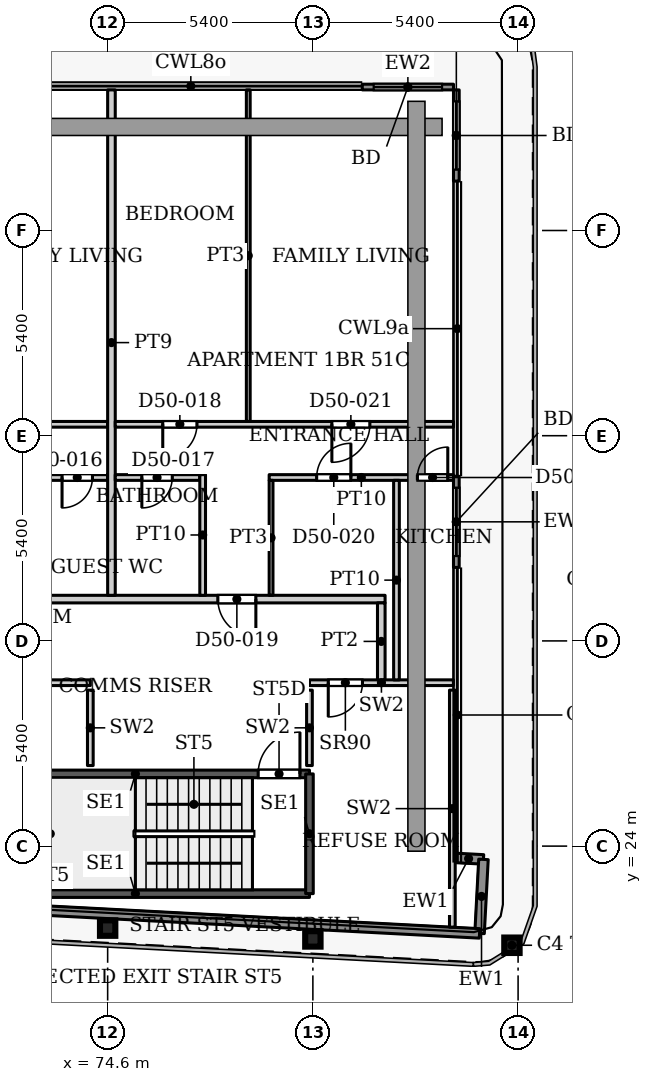
"""IFC4 building model, lengths in metres.
Left out: names, types, materials, properties, quantities, classifications, styles, units other than length and angle.
Written with IfcOpenShell. Run it as: python <this file> out.ifc"""

import sys

from ifc_helpers import new_model, si_unit, direction, frame, frame_2d, origin, origin_2d, place, context, subcontext, project, spatial, rectangle, i_section, extrude, source, transform, mapped, element, fill, save


model = new_model("IFC4")
c1 = context("Model", 3, precision=1e-05, world=origin(), true_north=direction((0.0, 1.0)))
c2 = subcontext(c1, "Body", "Model", "MODEL_VIEW")
j1 = project(units=[si_unit("LENGTHUNIT", "METRE"), si_unit("PLANEANGLEUNIT", "RADIAN")], contexts=[c1])
p1 = place(None, origin())
s1 = spatial("IfcSite", under=j1, at=p1, CompositionType="ELEMENT")
p2 = place(p1, origin())
s2 = spatial("IfcBuilding", under=s1, at=p2, CompositionType="ELEMENT")
p3 = place(p2, frame((0.0, 0.0, 220.1)))
s3 = spatial("IfcBuildingStorey", under=s2, at=p3, CompositionType="ELEMENT", Elevation=220.1)
for number, where, z_axis, x_axis in (
    (1, (85.238, 21.391, 0.0), (0.0, 0.0, 1.0), (1.0, 0.0, 0.0)),
    (2, (80.0, 21.558, 0.0), (0.0, 0.0, 1.0), (1.0, 0.0, 0.0)),
    (3, (74.6, 21.843, 0.0), (0.0, 0.0, 1.0), (1.0, 0.0, 0.0)),
):
    element("IfcColumn", number, at=place(p3, frame(where, z_axis=z_axis, x_axis=x_axis)), inside=s3, PredefinedType="COLUMN", context=c2, shape_type="SweptSolid", body=[
        extrude(i_section(OverallWidth=0.404, OverallDepth=0.407, WebThickness=0.027, FlangeThickness=0.044, FilletRadius=0.012, at=origin_2d()), origin(), (0.0, 0.0, 1.0), 3.9),
    ])
p4 = place(p3, frame((81.3, 43.975, 0.0), z_axis=(0.0, 0.0, 1.0), x_axis=(1.0, 0.0, 0.0)))
e4 = element("IfcWall", 4, at=p4, inside=s3, PredefinedType="SOLIDWALL", context=c2, shape_type="SweptSolid", body=[
    extrude(rectangle(XDim=2.4, YDim=0.15, at=frame_2d((1.2, 0.0))), origin(), (0.0, 0.0, 1.0), 3.75),
])
p5 = place(p4, frame((0.3, 0.0, 0.0)))
e5 = element("IfcOpeningElement", 5, at=p5, cuts=e4, PredefinedType="OPENING", context=c2, shape_type="SweptSolid", body=[
    extrude(rectangle(XDim=1.8, YDim=2.4, at=frame_2d((0.9, 1.2))), frame((0.0, 0.085, 0.0), z_axis=(0.0, -1.0, 0.0), x_axis=(1.0, 0.0, 0.0)), (0.0, 0.0, 1.0), 0.17),
])
p6 = place(p3, frame((83.775, 43.9, 0.0), z_axis=(0.0, 0.0, 1.0), x_axis=(0.0, -1.0, 0.0)))
e6 = element("IfcWall", 6, at=p6, inside=s3, PredefinedType="SOLIDWALL", context=c2, shape_type="SweptSolid", body=[
    extrude(rectangle(XDim=2.4, YDim=0.15, at=frame_2d((1.2, 0.0))), origin(), (0.0, 0.0, 1.0), 3.75),
])
p7 = place(p6, frame((0.3, 0.0, 0.0)))
e7 = element("IfcOpeningElement", 7, at=p7, cuts=e6, PredefinedType="OPENING", context=c2, shape_type="SweptSolid", body=[
    extrude(rectangle(XDim=1.8, YDim=2.4, at=frame_2d((0.9, 1.2))), frame((0.0, 0.085, 0.0), z_axis=(0.0, -1.0, 0.0), x_axis=(1.0, 0.0, 0.0)), (0.0, 0.0, 1.0), 0.17),
])
p8 = place(p3, frame((83.775, 33.733, 0.0), z_axis=(0.0, 0.0, 1.0), x_axis=(0.0, -1.0, 0.0)))
e8 = element("IfcWall", 8, at=p8, inside=s3, PredefinedType="SOLIDWALL", context=c2, shape_type="SweptSolid", body=[
    extrude(rectangle(XDim=2.399, YDim=0.15, at=frame_2d((1.199, 0.0))), origin(), (0.0, 0.0, 1.0), 3.75),
])
p9 = place(p8, frame((0.3, 0.0, 0.0)))
e9 = element("IfcOpeningElement", 9, at=p9, cuts=e8, PredefinedType="OPENING", context=c2, shape_type="SweptSolid", body=[
    extrude(rectangle(XDim=1.8, YDim=2.4, at=frame_2d((0.9, 1.2))), frame((0.0, 0.085, 0.0), z_axis=(0.0, -1.0, 0.0), x_axis=(1.0, 0.0, 0.0)), (0.0, 0.0, 1.0), 0.17),
])
p10 = place(p3, frame((83.707, 23.692, 0.0), z_axis=(0.0, 0.0, 1.0), x_axis=(0.998561284263, -0.053622398031, 0.0)))
e10 = element("IfcWall", 10, at=p10, inside=s3, PredefinedType="SOLIDWALL", context=c2, shape_type="SweptSolid", body=[
    extrude(rectangle(XDim=0.783, YDim=0.25, at=frame_2d((0.392, 0.0))), origin(), (0.0, 0.0, 1.0), 3.75),
])
p11 = place(p3, frame((84.489, 23.65, 0.0), z_axis=(0.0, 0.0, 1.0), x_axis=(-0.052841433274, -0.998602915542, 0.0)))
e11 = element("IfcWall", 11, at=p11, inside=s3, PredefinedType="SOLIDWALL", context=c2, shape_type="SweptSolid", body=[
    extrude(rectangle(XDim=1.95, YDim=0.25, at=frame_2d((0.975, 0.0))), origin(), (0.0, 0.0, 1.0), 3.75),
])
p12 = place(p3, frame((84.386, 21.703, 0.0), z_axis=(0.0, 0.0, 1.0), x_axis=(-0.998617508267, 0.05256493302, 0.0)))
e12 = element("IfcWall", 12, at=p12, inside=s3, PredefinedType="SOLIDWALL", context=c2, shape_type="SweptSolid", body=[
    extrude(rectangle(XDim=50.417, YDim=0.25, at=frame_2d((25.208, 0.0))), origin(), (0.0, 0.0, 1.0), 3.75),
])
p13 = place(p3, frame((70.75, 22.75, 0.0), z_axis=(0.0, 0.0, 1.0), x_axis=(1.0, 0.0, 0.0)))
e13 = element("IfcWall", 13, at=p13, inside=s3, PredefinedType="SHEAR", context=c2, shape_type="SweptSolid", body=[
    extrude(rectangle(XDim=9.16, YDim=0.2, at=frame_2d((4.58, 0.0))), origin(), (0.0, 0.0, 1.0), 3.9),
])
p14 = place(p3, frame((70.75, 25.9, 0.0), z_axis=(0.0, 0.0, 1.0), x_axis=(1.0, 0.0, 0.0)))
e14 = element("IfcWall", 14, at=p14, inside=s3, PredefinedType="SHEAR", context=c2, shape_type="SweptSolid", body=[
    extrude(rectangle(XDim=9.16, YDim=0.2, at=frame_2d((4.58, 0.0))), origin(), (0.0, 0.0, 1.0), 3.9),
])
p15 = place(p14, frame((7.81, 0.0, 0.0)))
e15 = element("IfcOpeningElement", 15, at=p15, cuts=e14, PredefinedType="OPENING", context=c2, shape_type="SweptSolid", body=[
    extrude(rectangle(XDim=1.1, YDim=2.2, at=frame_2d((0.55, 1.1))), frame((0.0, 0.11, 0.0), z_axis=(0.0, -1.0, 0.0), x_axis=(1.0, 0.0, 0.0)), (0.0, 0.0, 1.0), 0.22),
])
p16 = place(p3, frame((79.91, 22.75, 0.0), z_axis=(0.0, 0.0, 1.0), x_axis=(0.0, 1.0, 0.0)))
e16 = element("IfcWall", 16, at=p16, inside=s3, PredefinedType="SHEAR", context=c2, shape_type="SweptSolid", body=[
    extrude(rectangle(XDim=3.15, YDim=0.2, at=frame_2d((1.575, 0.0))), origin(), (0.0, 0.0, 1.0), 3.9),
])
p17 = place(p3, frame((70.75, 28.3, 0.0), z_axis=(0.0, 0.0, 1.0), x_axis=(1.0, 0.0, 0.0)))
e17 = element("IfcWall", 17, at=p17, inside=s3, PredefinedType="PARTITIONING", context=c2, shape_type="SweptSolid", body=[
    extrude(rectangle(XDim=3.394, YDim=0.15, at=frame_2d((1.697, 0.0))), origin(), (0.0, 0.0, 1.0), 3.9),
])
p18 = place(p17, frame((1.247, 0.0, 0.0)))
e18 = element("IfcOpeningElement", 18, at=p18, cuts=e17, PredefinedType="OPENING", context=c2, shape_type="SweptSolid", body=[
    extrude(rectangle(XDim=0.9, YDim=2.2, at=frame_2d((0.45, 1.1))), frame((0.0, 0.085, 0.0), z_axis=(0.0, -1.0, 0.0), x_axis=(1.0, 0.0, 0.0)), (0.0, 0.0, 1.0), 0.17),
])
p19 = place(p3, frame((74.144, 26.12, 0.0), z_axis=(0.0, 0.0, 1.0), x_axis=(0.0, 1.0, 0.0)))
e19 = element("IfcWall", 19, at=p19, inside=s3, PredefinedType="PARTITIONING", context=c2, shape_type="SweptSolid", body=[
    extrude(rectangle(XDim=1.985, YDim=0.15, at=frame_2d((0.992, 0.0))), origin(), (0.0, 0.0, 1.0), 3.9),
])
p20 = place(p3, frame((79.91, 28.3, 0.0), z_axis=(0.0, 0.0, 1.0), x_axis=(1.0, 0.0, 0.0)))
e20 = element("IfcWall", 20, at=p20, inside=s3, PredefinedType="PARTITIONING", context=c2, shape_type="SweptSolid", body=[
    extrude(rectangle(XDim=3.788, YDim=0.15, at=frame_2d((1.894, 0.0))), origin(), (0.0, 0.0, 1.0), 3.9),
])
p21 = place(p20, frame((0.495, 0.0, 0.0)))
e21 = element("IfcOpeningElement", 21, at=p21, cuts=e20, PredefinedType="OPENING", context=c2, shape_type="SweptSolid", body=[
    extrude(rectangle(XDim=0.9, YDim=2.2, at=frame_2d((0.45, 1.1))), frame((0.0, 0.085, 0.0), z_axis=(0.0, -1.0, 0.0), x_axis=(1.0, 0.0, 0.0)), (0.0, 0.0, 1.0), 0.17),
])
p22 = place(p3, frame((79.91, 26.12, 0.0), z_axis=(0.0, 0.0, 1.0), x_axis=(0.0, 1.0, 0.0)))
e22 = element("IfcWall", 22, at=p22, inside=s3, PredefinedType="PARTITIONING", context=c2, shape_type="SweptSolid", body=[
    extrude(rectangle(XDim=1.985, YDim=0.15, at=frame_2d((0.992, 0.0))), origin(), (0.0, 0.0, 1.0), 3.9),
])
p23 = place(p3, frame((83.67, 21.868, 0.0), z_axis=(0.0, 0.0, 1.0), x_axis=(0.0, 1.0, 0.0)))
e23 = element("IfcWall", 23, at=p23, inside=s3, PredefinedType="PARTITIONING", context=c2, shape_type="SweptSolid", body=[
    extrude(rectangle(XDim=6.237, YDim=0.15, at=frame_2d((3.119, 0.0))), origin(), (0.0, 0.0, 1.0), 3.9),
])
p24 = place(p3, frame((53.499, 30.5, 0.0), z_axis=(0.0, 0.0, 1.0), x_axis=(1.0, 0.0, 0.0)))
e24 = element("IfcWall", 24, at=p24, inside=s3, PredefinedType="PARTITIONING", context=c2, shape_type="SweptSolid", body=[
    extrude(rectangle(XDim=28.401, YDim=0.2, at=frame_2d((14.2, 0.0))), origin(), (0.0, 0.0, 1.0), 3.6),
])
p25 = place(p24, frame((10.201, 0.0, 0.0)))
e25 = element("IfcOpeningElement", 25, at=p25, cuts=e24, PredefinedType="OPENING", context=c2, shape_type="SweptSolid", body=[
    extrude(rectangle(XDim=1.0, YDim=2.1, at=frame_2d((0.5, 1.05))), frame((0.0, 0.11, 0.0), z_axis=(0.0, -1.0, 0.0), x_axis=(1.0, 0.0, 0.0)), (0.0, 0.0, 1.0), 0.22),
])
p26 = place(p24, frame((12.151, 0.0, 0.0)))
e26 = element("IfcOpeningElement", 26, at=p26, cuts=e24, PredefinedType="OPENING", context=c2, shape_type="SweptSolid", body=[
    extrude(rectangle(XDim=1.0, YDim=2.1, at=frame_2d((0.5, 1.05))), frame((0.0, 0.11, 0.0), z_axis=(0.0, -1.0, 0.0), x_axis=(1.0, 0.0, 0.0)), (0.0, 0.0, 1.0), 0.22),
])
p27 = place(p24, frame((24.001, 0.0, 0.0)))
e27 = element("IfcOpeningElement", 27, at=p27, cuts=e24, PredefinedType="OPENING", context=c2, shape_type="SweptSolid", body=[
    extrude(rectangle(XDim=1.0, YDim=2.1, at=frame_2d((0.5, 1.05))), frame((0.0, 0.11, 0.0), z_axis=(0.0, -1.0, 0.0), x_axis=(1.0, 0.0, 0.0)), (0.0, 0.0, 1.0), 0.22),
])
p28 = place(p3, frame((65.2, 35.1, 0.0), z_axis=(0.0, 0.0, 1.0), x_axis=(1.0, 0.0, 0.0)))
e28 = element("IfcWall", 28, at=p28, inside=s3, PredefinedType="PARTITIONING", context=c2, shape_type="SweptSolid", body=[
    extrude(rectangle(XDim=9.4, YDim=0.15, at=frame_2d((4.7, 0.0))), origin(), (0.0, 0.0, 1.0), 3.6),
])
p29 = place(p28, frame((1.4, 0.0, 0.0)))
e29 = element("IfcOpeningElement", 29, at=p29, cuts=e28, PredefinedType="OPENING", context=c2, shape_type="SweptSolid", body=[
    extrude(rectangle(XDim=0.9, YDim=2.1, at=frame_2d((0.45, 1.05))), frame((0.0, 0.085, 0.0), z_axis=(0.0, -1.0, 0.0), x_axis=(1.0, 0.0, 0.0)), (0.0, 0.0, 1.0), 0.17),
])
p30 = place(p28, frame((6.15, 0.0, 0.0)))
e30 = element("IfcOpeningElement", 30, at=p30, cuts=e28, PredefinedType="OPENING", context=c2, shape_type="SweptSolid", body=[
    extrude(rectangle(XDim=1.0, YDim=2.1, at=frame_2d((0.5, 1.05))), frame((0.0, 0.085, 0.0), z_axis=(0.0, -1.0, 0.0), x_axis=(1.0, 0.0, 0.0)), (0.0, 0.0, 1.0), 0.17),
])
p31 = place(p3, frame((67.125, 33.7, 0.0), z_axis=(0.0, 0.0, 1.0), x_axis=(1.0, 0.0, 0.0)))
e31 = element("IfcWall", 31, at=p31, inside=s3, PredefinedType="PARTITIONING", context=c2, shape_type="SweptSolid", body=[
    extrude(rectangle(XDim=7.475, YDim=0.15, at=frame_2d((3.738, 0.0))), origin(), (0.0, 0.0, 1.0), 3.6),
])
p32 = place(p31, frame((0.875, 0.0, 0.0)))
e32 = element("IfcOpeningElement", 32, at=p32, cuts=e31, PredefinedType="OPENING", context=c2, shape_type="SweptSolid", body=[
    extrude(rectangle(XDim=0.8, YDim=2.1, at=frame_2d((0.4, 1.05))), frame((0.0, 0.085, 0.0), z_axis=(0.0, -1.0, 0.0), x_axis=(1.0, 0.0, 0.0)), (0.0, 0.0, 1.0), 0.17),
])
p33 = place(p31, frame((3.675, 0.0, 0.0)))
e33 = element("IfcOpeningElement", 33, at=p33, cuts=e31, PredefinedType="OPENING", context=c2, shape_type="SweptSolid", body=[
    extrude(rectangle(XDim=0.9, YDim=2.1, at=frame_2d((0.45, 1.05))), frame((0.0, 0.085, 0.0), z_axis=(0.0, -1.0, 0.0), x_axis=(1.0, 0.0, 0.0)), (0.0, 0.0, 1.0), 0.17),
])
p34 = place(p31, frame((6.275, 0.0, 0.0)))
e34 = element("IfcOpeningElement", 34, at=p34, cuts=e31, PredefinedType="OPENING", context=c2, shape_type="SweptSolid", body=[
    extrude(rectangle(XDim=0.8, YDim=2.1, at=frame_2d((0.4, 1.05))), frame((0.0, 0.085, 0.0), z_axis=(0.0, -1.0, 0.0), x_axis=(1.0, 0.0, 0.0)), (0.0, 0.0, 1.0), 0.17),
])
p35 = place(p3, frame((74.7, 30.6, 0.0), z_axis=(0.0, 0.0, 1.0), x_axis=(0.0, 1.0, 0.0)))
e35 = element("IfcWall", 35, at=p35, inside=s3, PredefinedType="PARTITIONING", context=c2, shape_type="SweptSolid", body=[
    extrude(rectangle(XDim=13.3, YDim=0.2, at=frame_2d((6.65, 0.0))), origin(), (0.0, 0.0, 1.0), 3.6),
])
p36 = place(p3, frame((74.8, 33.7, 0.0), z_axis=(0.0, 0.0, 1.0), x_axis=(1.0, 0.0, 0.0)))
e36 = element("IfcWall", 36, at=p36, inside=s3, PredefinedType="PARTITIONING", context=c2, shape_type="SweptSolid", body=[
    extrude(rectangle(XDim=2.225, YDim=0.15, at=frame_2d((1.112, 0.0))), origin(), (0.0, 0.0, 1.0), 3.6),
])
p37 = place(p36, frame((0.7, 0.0, 0.0)))
e37 = element("IfcOpeningElement", 37, at=p37, cuts=e36, PredefinedType="OPENING", context=c2, shape_type="SweptSolid", body=[
    extrude(rectangle(XDim=0.8, YDim=2.1, at=frame_2d((0.4, 1.05))), frame((0.0, 0.085, 0.0), z_axis=(0.0, -1.0, 0.0), x_axis=(1.0, 0.0, 0.0)), (0.0, 0.0, 1.0), 0.17),
])
p38 = place(p3, frame((74.8, 35.1, 0.0), z_axis=(0.0, 0.0, 1.0), x_axis=(1.0, 0.0, 0.0)))
e38 = element("IfcWall", 38, at=p38, inside=s3, PredefinedType="PARTITIONING", context=c2, shape_type="SweptSolid", body=[
    extrude(rectangle(XDim=8.9, YDim=0.15, at=frame_2d((4.45, 0.0))), origin(), (0.0, 0.0, 1.0), 3.6),
])
p39 = place(p38, frame((1.25, 0.0, 0.0)))
e39 = element("IfcOpeningElement", 39, at=p39, cuts=e38, PredefinedType="OPENING", context=c2, shape_type="SweptSolid", body=[
    extrude(rectangle(XDim=0.9, YDim=2.1, at=frame_2d((0.45, 1.05))), frame((0.0, 0.085, 0.0), z_axis=(0.0, -1.0, 0.0), x_axis=(1.0, 0.0, 0.0)), (0.0, 0.0, 1.0), 0.17),
])
p40 = place(p38, frame((5.7, 0.0, 0.0)))
e40 = element("IfcOpeningElement", 40, at=p40, cuts=e38, PredefinedType="OPENING", context=c2, shape_type="SweptSolid", body=[
    extrude(rectangle(XDim=1.0, YDim=2.1, at=frame_2d((0.5, 1.05))), frame((0.0, 0.085, 0.0), z_axis=(0.0, -1.0, 0.0), x_axis=(1.0, 0.0, 0.0)), (0.0, 0.0, 1.0), 0.17),
])
p41 = place(p3, frame((77.1, 30.6, 0.0), z_axis=(0.0, 0.0, 1.0), x_axis=(0.0, 1.0, 0.0)))
e41 = element("IfcWall", 41, at=p41, inside=s3, PredefinedType="PARTITIONING", context=c2, shape_type="SweptSolid", body=[
    extrude(rectangle(XDim=3.175, YDim=0.15, at=frame_2d((1.587, 0.0))), origin(), (0.0, 0.0, 1.0), 3.6),
])
p42 = place(p3, frame((78.3, 35.175, 0.0), z_axis=(0.0, 0.0, 1.0), x_axis=(0.0, 1.0, 0.0)))
e42 = element("IfcWall", 42, at=p42, inside=s3, PredefinedType="PARTITIONING", context=c2, shape_type="SweptSolid", body=[
    extrude(rectangle(XDim=8.725, YDim=0.1, at=frame_2d((4.362, 0.0))), origin(), (0.0, 0.0, 1.0), 3.6),
])
p43 = place(p3, frame((78.85, 33.7, 0.0), z_axis=(0.0, 0.0, 1.0), x_axis=(1.0, 0.0, 0.0)))
e43 = element("IfcWall", 43, at=p43, inside=s3, PredefinedType="PARTITIONING", context=c2, shape_type="SweptSolid", body=[
    extrude(rectangle(XDim=4.85, YDim=0.15, at=frame_2d((2.425, 0.0))), origin(), (0.0, 0.0, 1.0), 3.6),
])
p44 = place(p43, frame((1.25, 0.0, 0.0)))
e44 = element("IfcOpeningElement", 44, at=p44, cuts=e43, PredefinedType="OPENING", context=c2, shape_type="SweptSolid", body=[
    extrude(rectangle(XDim=0.9, YDim=2.1, at=frame_2d((0.45, 1.05))), frame((0.0, 0.085, 0.0), z_axis=(0.0, -1.0, 0.0), x_axis=(1.0, 0.0, 0.0)), (0.0, 0.0, 1.0), 0.17),
])
p45 = place(p43, frame((3.9, 0.0, 0.0)))
e45 = element("IfcOpeningElement", 45, at=p45, cuts=e43, PredefinedType="OPENING", context=c2, shape_type="SweptSolid", body=[
    extrude(rectangle(XDim=0.8, YDim=2.1, at=frame_2d((0.4, 1.05))), frame((0.0, 0.085, 0.0), z_axis=(0.0, -1.0, 0.0), x_axis=(1.0, 0.0, 0.0)), (0.0, 0.0, 1.0), 0.17),
])
p46 = place(p3, frame((78.9, 30.6, 0.0), z_axis=(0.0, 0.0, 1.0), x_axis=(0.0, 1.0, 0.0)))
e46 = element("IfcWall", 46, at=p46, inside=s3, PredefinedType="PARTITIONING", context=c2, shape_type="SweptSolid", body=[
    extrude(rectangle(XDim=3.025, YDim=0.1, at=frame_2d((1.512, 0.0))), origin(), (0.0, 0.0, 1.0), 3.6),
])
p47 = place(p3, frame((81.8, 28.374, 0.0), z_axis=(0.0, 0.0, 1.0), x_axis=(0.0, 1.0, 0.0)))
e47 = element("IfcWall", 47, at=p47, inside=s3, PredefinedType="PARTITIONING", context=c2, shape_type="SweptSolid", body=[
    extrude(rectangle(XDim=2.026, YDim=0.2, at=frame_2d((1.013, 0.0))), origin(), (0.0, 0.0, 1.0), 3.6),
])
p48 = place(p3, frame((82.2, 28.374, 0.0), z_axis=(0.0, 0.0, 1.0), x_axis=(0.0, 1.0, 0.0)))
e48 = element("IfcWall", 48, at=p48, inside=s3, PredefinedType="PARTITIONING", context=c2, shape_type="SweptSolid", body=[
    extrude(rectangle(XDim=5.251, YDim=0.15, at=frame_2d((2.625, 0.0))), origin(), (0.0, 0.0, 1.0), 3.6),
])
m1 = source(origin(), c2, "Body", "SweptSolid", [
    extrude(rectangle(XDim=1.8, YDim=2.4, at=frame_2d((0.9, 1.2))), frame((0.0, 0.025, 0.0), z_axis=(0.0, -1.0, 0.0), x_axis=(1.0, 0.0, 0.0)), (0.0, 0.0, 1.0), 0.05),
])
p49 = place(p5, origin())
e49 = element("IfcDoor", 49, at=p49, inside=s3, OperationType="SLIDING_TO_LEFT", PredefinedType="DOOR", context=c2, shape_type="MappedRepresentation", body=[
    mapped(m1, transform((0.0, 0.0, 0.0), x_axis=(1.0, 0.0, 0.0), y_axis=(0.0, 1.0, 0.0), z_axis=(0.0, 0.0, 1.0), scale=1.0)),
])
fill(e5, e49)
p50 = place(p7, origin())
e50 = element("IfcDoor", 50, at=p50, inside=s3, OperationType="SLIDING_TO_LEFT", PredefinedType="DOOR", context=c2, shape_type="MappedRepresentation", body=[
    mapped(m1, transform((0.0, 0.0, 0.0), x_axis=(1.0, 0.0, 0.0), y_axis=(0.0, 1.0, 0.0), z_axis=(0.0, 0.0, 1.0), scale=1.0)),
])
fill(e7, e50)
p51 = place(p9, origin())
e51 = element("IfcDoor", 51, at=p51, inside=s3, OperationType="SLIDING_TO_LEFT", PredefinedType="DOOR", context=c2, shape_type="MappedRepresentation", body=[
    mapped(m1, transform((0.0, 0.0, 0.0), x_axis=(1.0, 0.0, 0.0), y_axis=(0.0, 1.0, 0.0), z_axis=(0.0, 0.0, 1.0), scale=1.0)),
])
fill(e9, e51)
m2 = source(origin(), c2, "Body", "SweptSolid", [
    extrude(rectangle(XDim=0.9, YDim=2.2, at=frame_2d((0.45, 1.1))), frame((0.0, 0.025, 0.0), z_axis=(0.0, -1.0, 0.0), x_axis=(1.0, 0.0, 0.0)), (0.0, 0.0, 1.0), 0.05),
])
p52 = place(p21, origin())
e52 = element("IfcDoor", 52, at=p52, inside=s3, OperationType="SINGLE_SWING_RIGHT", PredefinedType="DOOR", context=c2, shape_type="MappedRepresentation", body=[
    mapped(m2, transform((0.0, 0.0, 0.0), x_axis=(1.0, 0.0, 0.0), y_axis=(0.0, 1.0, 0.0), z_axis=(0.0, 0.0, 1.0), scale=1.0)),
])
fill(e21, e52)
m3 = source(origin(), c2, "Body", "SweptSolid", [
    extrude(rectangle(XDim=1.1, YDim=2.2, at=frame_2d((0.55, 1.1))), frame((0.0, 0.025, 0.0), z_axis=(0.0, -1.0, 0.0), x_axis=(1.0, 0.0, 0.0)), (0.0, 0.0, 1.0), 0.05),
])
p53 = place(p15, origin())
e53 = element("IfcDoor", 53, at=p53, inside=s3, OperationType="SINGLE_SWING_LEFT", PredefinedType="DOOR", context=c2, shape_type="MappedRepresentation", body=[
    mapped(m3, transform((0.0, 0.0, 0.0), x_axis=(1.0, 0.0, 0.0), y_axis=(0.0, 1.0, 0.0), z_axis=(0.0, 0.0, 1.0), scale=1.0)),
])
fill(e15, e53)
m4 = source(origin(), c2, "Body", "SweptSolid", [
    extrude(rectangle(XDim=0.8, YDim=2.1, at=frame_2d((0.4, 1.05))), frame((0.0, 0.025, 0.0), z_axis=(0.0, -1.0, 0.0), x_axis=(1.0, 0.0, 0.0)), (0.0, 0.0, 1.0), 0.05),
])
p54 = place(p34, origin())
e54 = element("IfcDoor", 54, at=p54, inside=s3, OperationType="SINGLE_SWING_RIGHT", PredefinedType="DOOR", context=c2, shape_type="MappedRepresentation", body=[
    mapped(m4, transform((0.0, 0.0, 0.0), x_axis=(1.0, 0.0, 0.0), y_axis=(0.0, 1.0, 0.0), z_axis=(0.0, 0.0, 1.0), scale=1.0)),
])
fill(e34, e54)
p55 = place(p37, origin())
e55 = element("IfcDoor", 55, at=p55, inside=s3, OperationType="SINGLE_SWING_RIGHT", PredefinedType="DOOR", context=c2, shape_type="MappedRepresentation", body=[
    mapped(m4, transform((0.0, 0.0, 0.0), x_axis=(1.0, 0.0, 0.0), y_axis=(0.0, 1.0, 0.0), z_axis=(0.0, 0.0, 1.0), scale=1.0)),
])
fill(e37, e55)
m5 = source(origin(), c2, "Body", "SweptSolid", [
    extrude(rectangle(XDim=0.9, YDim=2.1, at=frame_2d((0.45, 1.05))), frame((0.0, 0.025, 0.0), z_axis=(0.0, -1.0, 0.0), x_axis=(1.0, 0.0, 0.0)), (0.0, 0.0, 1.0), 0.05),
])
p56 = place(p39, origin())
e56 = element("IfcDoor", 56, at=p56, inside=s3, OperationType="SINGLE_SWING_RIGHT", PredefinedType="DOOR", context=c2, shape_type="MappedRepresentation", body=[
    mapped(m5, transform((0.0, 0.0, 0.0), x_axis=(1.0, 0.0, 0.0), y_axis=(0.0, 1.0, 0.0), z_axis=(0.0, 0.0, 1.0), scale=1.0)),
])
fill(e39, e56)
m6 = source(origin(), c2, "Body", "SweptSolid", [
    extrude(rectangle(XDim=1.0, YDim=2.1, at=frame_2d((0.5, 1.05))), frame((0.0, 0.025, 0.0), z_axis=(0.0, -1.0, 0.0), x_axis=(1.0, 0.0, 0.0)), (0.0, 0.0, 1.0), 0.05),
])
p57 = place(p27, origin())
e57 = element("IfcDoor", 57, at=p57, inside=s3, OperationType="SINGLE_SWING_RIGHT", PredefinedType="DOOR", context=c2, shape_type="MappedRepresentation", body=[
    mapped(m6, transform((0.0, 0.0, 0.0), x_axis=(1.0, 0.0, 0.0), y_axis=(0.0, 1.0, 0.0), z_axis=(0.0, 0.0, 1.0), scale=1.0)),
])
fill(e27, e57)
p58 = place(p44, origin())
e58 = element("IfcDoor", 58, at=p58, inside=s3, OperationType="SINGLE_SWING_LEFT", PredefinedType="DOOR", context=c2, shape_type="MappedRepresentation", body=[
    mapped(m5, transform((0.0, 0.0, 0.0), x_axis=(1.0, 0.0, 0.0), y_axis=(0.0, 1.0, 0.0), z_axis=(0.0, 0.0, 1.0), scale=1.0)),
])
fill(e44, e58)
m7 = source(origin(), c2, "Body", "SweptSolid", [
    extrude(rectangle(XDim=1.0, YDim=2.1, at=frame_2d((0.5, 1.05))), frame((0.0, 0.025, 0.0), z_axis=(0.0, -1.0, 0.0), x_axis=(1.0, 0.0, 0.0)), (0.0, 0.0, 1.0), 0.05),
])
p59 = place(p40, origin())
e59 = element("IfcDoor", 59, at=p59, inside=s3, OperationType="SINGLE_SWING_RIGHT", PredefinedType="DOOR", context=c2, shape_type="MappedRepresentation", body=[
    mapped(m7, transform((0.0, 0.0, 0.0), x_axis=(1.0, 0.0, 0.0), y_axis=(0.0, 1.0, 0.0), z_axis=(0.0, 0.0, 1.0), scale=1.0)),
])
fill(e40, e59)
p60 = place(p45, origin())
e60 = element("IfcDoor", 60, at=p60, inside=s3, OperationType="SINGLE_SWING_LEFT", PredefinedType="DOOR", context=c2, shape_type="MappedRepresentation", body=[
    mapped(m4, transform((0.0, 0.0, 0.0), x_axis=(1.0, 0.0, 0.0), y_axis=(0.0, 1.0, 0.0), z_axis=(0.0, 0.0, 1.0), scale=1.0)),
])
fill(e45, e60)
save(model, sys.argv[1])
